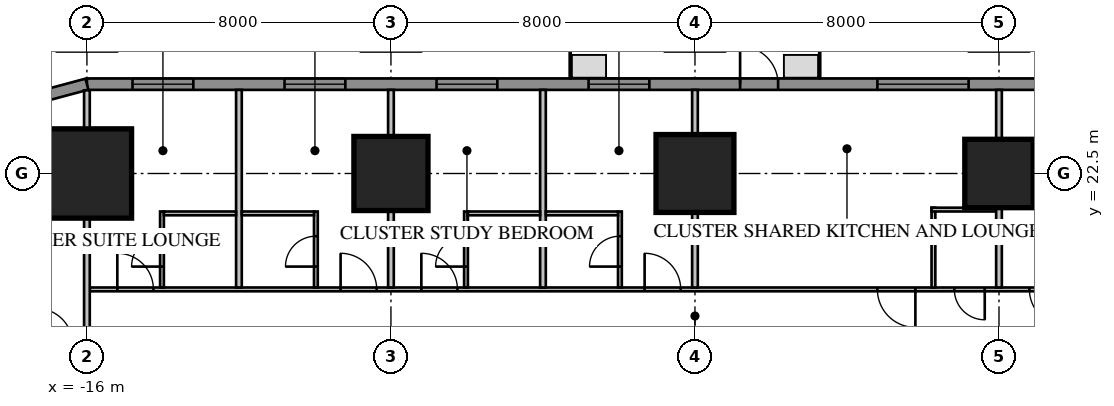
"""IFC4 building model, lengths in metres.
Left out: names, types, materials, properties, quantities, classifications, styles, units other than length and angle.
Written with IfcOpenShell. Run it as: python <this file> out.ifc"""

import sys

from ifc_helpers import new_model, si_unit, direction, frame, frame_2d, origin, origin_2d, place, context, subcontext, project, spatial, rectangle, extrude, element, fill, save


model = new_model("IFC4")
c1 = context("Model", 3, precision=1e-05, world=origin(), true_north=direction((0.0, 1.0)))
c2 = subcontext(c1, "Body", "Model", "MODEL_VIEW")
j1 = project(units=[si_unit("LENGTHUNIT", "METRE"), si_unit("PLANEANGLEUNIT", "RADIAN")], contexts=[c1])
p1 = place(None, origin())
s1 = spatial("IfcSite", under=j1, at=p1, CompositionType="ELEMENT")
p2 = place(p1, origin())
s2 = spatial("IfcBuilding", under=s1, at=p2, CompositionType="ELEMENT")
p3 = place(p2, frame((0.0, 0.0, 35.25)))
s3 = spatial("IfcBuildingStorey", under=s2, at=p3, CompositionType="ELEMENT", Elevation=35.25)
p4 = place(p3, frame((8.0, 22.5, 0.0), z_axis=(0.0, 0.0, 1.0), x_axis=(1.0, 0.0, 0.0)))
e1 = element("IfcColumn", 1, at=p4, inside=s3, PredefinedType="COLUMN", context=c2, shape_type="SweptSolid", body=[
    extrude(rectangle(XDim=1.8, YDim=1.8, at=origin_2d()), origin(), (0.0, 0.0, 1.0), 3.85),
])
p5 = place(p3, frame((0.0, 22.5, 0.0), z_axis=(0.0, 0.0, 1.0), x_axis=(1.0, 0.0, 0.0)))
e2 = element("IfcColumn", 2, at=p5, inside=s3, PredefinedType="COLUMN", context=c2, shape_type="SweptSolid", body=[
    extrude(rectangle(XDim=2.05, YDim=2.05, at=origin_2d()), origin(), (0.0, 0.0, 1.0), 3.85),
])
p6 = place(p3, frame((-8.0, 22.5, 0.0), z_axis=(0.0, 0.0, 1.0), x_axis=(1.0, 0.0, 0.0)))
e3 = element("IfcColumn", 3, at=p6, inside=s3, PredefinedType="COLUMN", context=c2, shape_type="SweptSolid", body=[
    extrude(rectangle(XDim=1.95, YDim=1.95, at=origin_2d()), origin(), (0.0, 0.0, 1.0), 3.85),
])
p7 = place(p3, frame((-16.0, 22.5, 0.0), z_axis=(0.0, 0.0, 1.0), x_axis=(1.0, 0.0, 0.0)))
e4 = element("IfcColumn", 4, at=p7, inside=s3, PredefinedType="COLUMN", context=c2, shape_type="SweptSolid", body=[
    extrude(rectangle(XDim=2.35, YDim=2.35, at=origin_2d()), origin(), (0.0, 0.0, 1.0), 3.85),
])
p8 = place(p3, frame((16.0, 24.85, 0.0), z_axis=(0.0, 0.0, 1.0), x_axis=(-1.0, 0.0, 0.0)))
e5 = element("IfcWall", 5, at=p8, inside=s3, PredefinedType="SOLIDWALL", context=c2, shape_type="SweptSolid", body=[
    extrude(rectangle(XDim=32.0, YDim=0.3, at=frame_2d((16.0, 0.0))), origin(), (0.0, 0.0, 1.0), 3.65),
])
p9 = place(p8, frame((1.2, 0.0, 0.75)))
e6 = element("IfcOpeningElement", 6, at=p9, cuts=e5, PredefinedType="OPENING", context=c2, shape_type="SweptSolid", body=[
    extrude(rectangle(XDim=1.6, YDim=1.8, at=frame_2d((0.8, 0.9))), frame((0.0, 0.17, 0.0), z_axis=(0.0, -1.0, 0.0), x_axis=(1.0, 0.0, 0.0)), (0.0, 0.0, 1.0), 0.34),
])
p10 = place(p8, frame((5.2, 0.0, 0.75)))
e7 = element("IfcOpeningElement", 7, at=p10, cuts=e5, PredefinedType="OPENING", context=c2, shape_type="SweptSolid", body=[
    extrude(rectangle(XDim=1.6, YDim=1.8, at=frame_2d((0.8, 0.9))), frame((0.0, 0.17, 0.0), z_axis=(0.0, -1.0, 0.0), x_axis=(1.0, 0.0, 0.0)), (0.0, 0.0, 1.0), 0.34),
])
p11 = place(p8, frame((17.2, 0.0, 0.75)))
e8 = element("IfcOpeningElement", 8, at=p11, cuts=e5, PredefinedType="OPENING", context=c2, shape_type="SweptSolid", body=[
    extrude(rectangle(XDim=1.6, YDim=1.8, at=frame_2d((0.8, 0.9))), frame((0.0, 0.17, 0.0), z_axis=(0.0, -1.0, 0.0), x_axis=(1.0, 0.0, 0.0)), (0.0, 0.0, 1.0), 0.34),
])
p12 = place(p8, frame((21.2, 0.0, 0.75)))
e9 = element("IfcOpeningElement", 9, at=p12, cuts=e5, PredefinedType="OPENING", context=c2, shape_type="SweptSolid", body=[
    extrude(rectangle(XDim=1.6, YDim=1.8, at=frame_2d((0.8, 0.9))), frame((0.0, 0.17, 0.0), z_axis=(0.0, -1.0, 0.0), x_axis=(1.0, 0.0, 0.0)), (0.0, 0.0, 1.0), 0.34),
])
p13 = place(p8, frame((25.2, 0.0, 0.75)))
e10 = element("IfcOpeningElement", 10, at=p13, cuts=e5, PredefinedType="OPENING", context=c2, shape_type="SweptSolid", body=[
    extrude(rectangle(XDim=1.6, YDim=1.8, at=frame_2d((0.8, 0.9))), frame((0.0, 0.17, 0.0), z_axis=(0.0, -1.0, 0.0), x_axis=(1.0, 0.0, 0.0)), (0.0, 0.0, 1.0), 0.34),
])
p14 = place(p8, frame((29.2, 0.0, 0.75)))
e11 = element("IfcOpeningElement", 11, at=p14, cuts=e5, PredefinedType="OPENING", context=c2, shape_type="SweptSolid", body=[
    extrude(rectangle(XDim=1.6, YDim=1.8, at=frame_2d((0.8, 0.9))), frame((0.0, 0.17, 0.0), z_axis=(0.0, -1.0, 0.0), x_axis=(1.0, 0.0, 0.0)), (0.0, 0.0, 1.0), 0.34),
])
p15 = place(p8, frame((8.8, 0.0, 0.75)))
e12 = element("IfcOpeningElement", 12, at=p15, cuts=e5, PredefinedType="OPENING", context=c2, shape_type="SweptSolid", body=[
    extrude(rectangle(XDim=2.4, YDim=1.8, at=frame_2d((1.2, 0.9))), frame((0.0, 0.17, 0.0), z_axis=(0.0, -1.0, 0.0), x_axis=(1.0, 0.0, 0.0)), (0.0, 0.0, 1.0), 0.34),
])
p16 = place(p8, frame((13.812, 0.0, 0.0)))
e13 = element("IfcOpeningElement", 13, at=p16, cuts=e5, PredefinedType="OPENING", context=c2, shape_type="SweptSolid", body=[
    extrude(rectangle(XDim=1.0, YDim=2.4, at=frame_2d((0.5, 1.2))), frame((0.0, 0.17, 0.0), z_axis=(0.0, -1.0, 0.0), x_axis=(1.0, 0.0, 0.0)), (0.0, 0.0, 1.0), 0.34),
])
p17 = place(p3, frame((-16.0, 24.85, 0.0), z_axis=(0.0, 0.0, 1.0), x_axis=(-0.965920218567, -0.258839972501, 0.0)))
e14 = element("IfcWall", 14, at=p17, inside=s3, PredefinedType="SOLIDWALL", context=c2, shape_type="SweptSolid", body=[
    extrude(rectangle(XDim=4.581, YDim=0.3, at=frame_2d((2.291, 0.0))), origin(), (0.0, 0.0, 1.0), 3.65),
])
p18 = place(p3, frame((15.925, 19.45, 0.0), z_axis=(0.0, 0.0, 1.0), x_axis=(-1.0, 0.0, 0.0)))
e15 = element("IfcWall", 15, at=p18, inside=s3, PredefinedType="PARTITIONING", context=c2, shape_type="SweptSolid", body=[
    extrude(rectangle(XDim=31.85, YDim=0.1, at=frame_2d((15.925, 0.0))), origin(), (0.0, 0.0, 1.0), 3.65),
])
p19 = place(p18, frame((10.125, 0.0, 0.0)))
e16 = element("IfcOpeningElement", 16, at=p19, cuts=e15, PredefinedType="OPENING", context=c2, shape_type="SweptSolid", body=[
    extrude(rectangle(XDim=1.0, YDim=2.1, at=frame_2d((0.5, 1.05))), frame((0.0, 0.07, 0.0), z_axis=(0.0, -1.0, 0.0), x_axis=(1.0, 0.0, 0.0)), (0.0, 0.0, 1.0), 0.14),
])
p20 = place(p18, frame((8.3, 0.0, 0.0)))
e17 = element("IfcOpeningElement", 17, at=p20, cuts=e15, PredefinedType="OPENING", context=c2, shape_type="SweptSolid", body=[
    extrude(rectangle(XDim=0.8, YDim=2.1, at=frame_2d((0.4, 1.05))), frame((0.0, 0.07, 0.0), z_axis=(0.0, -1.0, 0.0), x_axis=(1.0, 0.0, 0.0)), (0.0, 0.0, 1.0), 0.14),
])
p21 = place(p18, frame((0.3, 0.0, 0.0)))
e18 = element("IfcOpeningElement", 18, at=p21, cuts=e15, PredefinedType="OPENING", context=c2, shape_type="SweptSolid", body=[
    extrude(rectangle(XDim=0.95, YDim=2.1, at=frame_2d((0.475, 1.05))), frame((0.0, 0.07, 0.0), z_axis=(0.0, -1.0, 0.0), x_axis=(1.0, 0.0, 0.0)), (0.0, 0.0, 1.0), 0.14),
])
p22 = place(p18, frame((6.175, 0.0, 0.0)))
e19 = element("IfcOpeningElement", 19, at=p22, cuts=e15, PredefinedType="OPENING", context=c2, shape_type="SweptSolid", body=[
    extrude(rectangle(XDim=0.95, YDim=2.1, at=frame_2d((0.475, 1.05))), frame((0.0, 0.07, 0.0), z_axis=(0.0, -1.0, 0.0), x_axis=(1.0, 0.0, 0.0)), (0.0, 0.0, 1.0), 0.14),
])
p23 = place(p18, frame((16.3, 0.0, 0.0)))
e20 = element("IfcOpeningElement", 20, at=p23, cuts=e15, PredefinedType="OPENING", context=c2, shape_type="SweptSolid", body=[
    extrude(rectangle(XDim=0.95, YDim=2.1, at=frame_2d((0.475, 1.05))), frame((0.0, 0.07, 0.0), z_axis=(0.0, -1.0, 0.0), x_axis=(1.0, 0.0, 0.0)), (0.0, 0.0, 1.0), 0.14),
])
p24 = place(p18, frame((22.175, 0.0, 0.0)))
e21 = element("IfcOpeningElement", 21, at=p24, cuts=e15, PredefinedType="OPENING", context=c2, shape_type="SweptSolid", body=[
    extrude(rectangle(XDim=0.95, YDim=2.1, at=frame_2d((0.475, 1.05))), frame((0.0, 0.07, 0.0), z_axis=(0.0, -1.0, 0.0), x_axis=(1.0, 0.0, 0.0)), (0.0, 0.0, 1.0), 0.14),
])
p25 = place(p18, frame((24.3, 0.0, 0.0)))
e22 = element("IfcOpeningElement", 22, at=p25, cuts=e15, PredefinedType="OPENING", context=c2, shape_type="SweptSolid", body=[
    extrude(rectangle(XDim=0.95, YDim=2.1, at=frame_2d((0.475, 1.05))), frame((0.0, 0.07, 0.0), z_axis=(0.0, -1.0, 0.0), x_axis=(1.0, 0.0, 0.0)), (0.0, 0.0, 1.0), 0.14),
])
p26 = place(p18, frame((30.175, 0.0, 0.0)))
e23 = element("IfcOpeningElement", 23, at=p26, cuts=e15, PredefinedType="OPENING", context=c2, shape_type="SweptSolid", body=[
    extrude(rectangle(XDim=0.95, YDim=2.1, at=frame_2d((0.475, 1.05))), frame((0.0, 0.07, 0.0), z_axis=(0.0, -1.0, 0.0), x_axis=(1.0, 0.0, 0.0)), (0.0, 0.0, 1.0), 0.14),
])
p27 = place(p3, frame((6.275, 19.5, 0.0), z_axis=(0.0, 0.0, 1.0), x_axis=(0.0, 1.0, 0.0)))
e24 = element("IfcWall", 24, at=p27, inside=s3, PredefinedType="PARTITIONING", context=c2, shape_type="SweptSolid", body=[
    extrude(rectangle(XDim=2.1, YDim=0.1, at=frame_2d((1.05, 0.0))), origin(), (0.0, 0.0, 1.0), 3.65),
])
p28 = place(p3, frame((7.925, 21.55, 0.0), z_axis=(0.0, 0.0, 1.0), x_axis=(-1.0, 0.0, 0.0)))
e25 = element("IfcWall", 25, at=p28, inside=s3, PredefinedType="PARTITIONING", context=c2, shape_type="SweptSolid", body=[
    extrude(rectangle(XDim=1.7, YDim=0.1, at=frame_2d((0.85, 0.0))), origin(), (0.0, 0.0, 1.0), 3.65),
])
p29 = place(p3, frame((8.0, 19.5, 0.0), z_axis=(0.0, 0.0, 1.0), x_axis=(0.0, 1.0, 0.0)))
e26 = element("IfcWall", 26, at=p29, inside=s3, PredefinedType="PARTITIONING", context=c2, shape_type="SweptSolid", body=[
    extrude(rectangle(XDim=5.2, YDim=0.15, at=frame_2d((2.6, 0.0))), origin(), (0.0, 0.0, 1.0), 3.65),
])
p30 = place(p3, frame((0.0, 19.5, 0.0), z_axis=(0.0, 0.0, 1.0), x_axis=(0.0, 1.0, 0.0)))
e27 = element("IfcWall", 27, at=p30, inside=s3, PredefinedType="PARTITIONING", context=c2, shape_type="SweptSolid", body=[
    extrude(rectangle(XDim=5.2, YDim=0.15, at=frame_2d((2.6, 0.0))), origin(), (0.0, 0.0, 1.0), 2.809),
])
for number, where, z_axis, x_axis in (
    (28, (-4.0, 19.5, 0.0), (0.0, 0.0, 1.0), (0.0, 1.0, 0.0)),
    (29, (-8.0, 19.5, 0.0), (0.0, 0.0, 1.0), (0.0, 1.0, 0.0)),
    (30, (-12.0, 19.5, 0.0), (0.0, 0.0, 1.0), (0.0, 1.0, 0.0)),
):
    element("IfcWall", number, at=place(p3, frame(where, z_axis=z_axis, x_axis=x_axis)), inside=s3, PredefinedType="PARTITIONING", context=c2, shape_type="SweptSolid", body=[
        extrude(rectangle(XDim=5.2, YDim=0.15, at=frame_2d((2.6, 0.0))), origin(), (0.0, 0.0, 1.0), 3.65),
    ])
p31 = place(p3, frame((-16.0, 18.1, 0.0), z_axis=(0.0, 0.0, 1.0), x_axis=(0.0, 1.0, 0.0)))
e31 = element("IfcWall", 31, at=p31, inside=s3, PredefinedType="PARTITIONING", context=c2, shape_type="SweptSolid", body=[
    extrude(rectangle(XDim=6.589, YDim=0.15, at=frame_2d((3.295, 0.0))), origin(), (0.0, 0.0, 1.0), 3.65),
])
p32 = place(p3, frame((-1.975, 19.5, 0.0), z_axis=(0.0, 0.0, 1.0), x_axis=(0.0, 1.0, 0.0)))
e32 = element("IfcWall", 32, at=p32, inside=s3, PredefinedType="PARTITIONING", context=c2, shape_type="SweptSolid", body=[
    extrude(rectangle(XDim=2.0, YDim=0.1, at=frame_2d((1.0, 0.0))), origin(), (0.0, 0.0, 1.0), 3.65),
])
p33 = place(p32, frame((0.55, 0.0, 0.0)))
e33 = element("IfcOpeningElement", 33, at=p33, cuts=e32, PredefinedType="OPENING", context=c2, shape_type="SweptSolid", body=[
    extrude(rectangle(XDim=0.8, YDim=2.1, at=frame_2d((0.4, 1.05))), frame((0.0, 0.07, 0.0), z_axis=(0.0, -1.0, 0.0), x_axis=(1.0, 0.0, 0.0)), (0.0, 0.0, 1.0), 0.14),
])
p34 = place(p3, frame((-2.025, 21.45, 0.0), z_axis=(0.0, 0.0, 1.0), x_axis=(-1.0, 0.0, 0.0)))
e34 = element("IfcWall", 34, at=p34, inside=s3, PredefinedType="PARTITIONING", context=c2, shape_type="SweptSolid", body=[
    extrude(rectangle(XDim=1.9, YDim=0.1, at=frame_2d((0.95, 0.0))), origin(), (0.0, 0.0, 1.0), 3.65),
])
p35 = place(p3, frame((-6.025, 19.5, 0.0), z_axis=(0.0, 0.0, 1.0), x_axis=(0.0, 1.0, 0.0)))
e35 = element("IfcWall", 35, at=p35, inside=s3, PredefinedType="PARTITIONING", context=c2, shape_type="SweptSolid", body=[
    extrude(rectangle(XDim=2.0, YDim=0.1, at=frame_2d((1.0, 0.0))), origin(), (0.0, 0.0, 1.0), 3.65),
])
p36 = place(p35, frame((0.55, 0.0, 0.0)))
e36 = element("IfcOpeningElement", 36, at=p36, cuts=e35, PredefinedType="OPENING", context=c2, shape_type="SweptSolid", body=[
    extrude(rectangle(XDim=0.8, YDim=2.1, at=frame_2d((0.4, 1.05))), frame((0.0, 0.07, 0.0), z_axis=(0.0, -1.0, 0.0), x_axis=(1.0, 0.0, 0.0)), (0.0, 0.0, 1.0), 0.14),
])
p37 = place(p3, frame((-4.075, 21.45, 0.0), z_axis=(0.0, 0.0, 1.0), x_axis=(-1.0, 0.0, 0.0)))
e37 = element("IfcWall", 37, at=p37, inside=s3, PredefinedType="PARTITIONING", context=c2, shape_type="SweptSolid", body=[
    extrude(rectangle(XDim=1.9, YDim=0.1, at=frame_2d((0.95, 0.0))), origin(), (0.0, 0.0, 1.0), 3.65),
])
p38 = place(p3, frame((-9.975, 19.5, 0.0), z_axis=(0.0, 0.0, 1.0), x_axis=(0.0, 1.0, 0.0)))
e38 = element("IfcWall", 38, at=p38, inside=s3, PredefinedType="PARTITIONING", context=c2, shape_type="SweptSolid", body=[
    extrude(rectangle(XDim=2.0, YDim=0.1, at=frame_2d((1.0, 0.0))), origin(), (0.0, 0.0, 1.0), 3.65),
])
p39 = place(p38, frame((0.55, 0.0, 0.0)))
e39 = element("IfcOpeningElement", 39, at=p39, cuts=e38, PredefinedType="OPENING", context=c2, shape_type="SweptSolid", body=[
    extrude(rectangle(XDim=0.8, YDim=2.1, at=frame_2d((0.4, 1.05))), frame((0.0, 0.07, 0.0), z_axis=(0.0, -1.0, 0.0), x_axis=(1.0, 0.0, 0.0)), (0.0, 0.0, 1.0), 0.14),
])
p40 = place(p3, frame((-10.025, 21.45, 0.0), z_axis=(0.0, 0.0, 1.0), x_axis=(-1.0, 0.0, 0.0)))
e40 = element("IfcWall", 40, at=p40, inside=s3, PredefinedType="PARTITIONING", context=c2, shape_type="SweptSolid", body=[
    extrude(rectangle(XDim=1.9, YDim=0.1, at=frame_2d((0.95, 0.0))), origin(), (0.0, 0.0, 1.0), 3.65),
])
p41 = place(p3, frame((-14.025, 19.5, 0.0), z_axis=(0.0, 0.0, 1.0), x_axis=(0.0, 1.0, 0.0)))
e41 = element("IfcWall", 41, at=p41, inside=s3, PredefinedType="PARTITIONING", context=c2, shape_type="SweptSolid", body=[
    extrude(rectangle(XDim=2.0, YDim=0.1, at=frame_2d((1.0, 0.0))), origin(), (0.0, 0.0, 1.0), 3.65),
])
p42 = place(p41, frame((0.55, 0.0, 0.0)))
e42 = element("IfcOpeningElement", 42, at=p42, cuts=e41, PredefinedType="OPENING", context=c2, shape_type="SweptSolid", body=[
    extrude(rectangle(XDim=0.8, YDim=2.1, at=frame_2d((0.4, 1.05))), frame((0.0, 0.07, 0.0), z_axis=(0.0, -1.0, 0.0), x_axis=(1.0, 0.0, 0.0)), (0.0, 0.0, 1.0), 0.14),
])
p43 = place(p3, frame((-12.075, 21.45, 0.0), z_axis=(0.0, 0.0, 1.0), x_axis=(-1.0, 0.0, 0.0)))
e43 = element("IfcWall", 43, at=p43, inside=s3, PredefinedType="PARTITIONING", context=c2, shape_type="SweptSolid", body=[
    extrude(rectangle(XDim=1.9, YDim=0.1, at=frame_2d((0.95, 0.0))), origin(), (0.0, 0.0, 1.0), 3.65),
])
p44 = place(p11, origin())
e44 = element("IfcWindow", 44, at=p44, inside=s3, PartitioningType="SINGLE_PANEL", PredefinedType="WINDOW", context=c2, shape_type="SweptSolid", body=[
    extrude(rectangle(XDim=1.6, YDim=1.8, at=frame_2d((0.8, 0.9))), frame((0.0, 0.03, 0.0), z_axis=(0.0, -1.0, 0.0), x_axis=(1.0, 0.0, 0.0)), (0.0, 0.0, 1.0), 0.06),
])
fill(e8, e44)
p45 = place(p12, origin())
e45 = element("IfcWindow", 45, at=p45, inside=s3, PartitioningType="SINGLE_PANEL", PredefinedType="WINDOW", context=c2, shape_type="SweptSolid", body=[
    extrude(rectangle(XDim=1.6, YDim=1.8, at=frame_2d((0.8, 0.9))), frame((0.0, 0.03, 0.0), z_axis=(0.0, -1.0, 0.0), x_axis=(1.0, 0.0, 0.0)), (0.0, 0.0, 1.0), 0.06),
])
fill(e9, e45)
p46 = place(p13, origin())
e46 = element("IfcWindow", 46, at=p46, inside=s3, PartitioningType="SINGLE_PANEL", PredefinedType="WINDOW", context=c2, shape_type="SweptSolid", body=[
    extrude(rectangle(XDim=1.6, YDim=1.8, at=frame_2d((0.8, 0.9))), frame((0.0, 0.03, 0.0), z_axis=(0.0, -1.0, 0.0), x_axis=(1.0, 0.0, 0.0)), (0.0, 0.0, 1.0), 0.06),
])
fill(e10, e46)
p47 = place(p14, origin())
e47 = element("IfcWindow", 47, at=p47, inside=s3, PartitioningType="SINGLE_PANEL", PredefinedType="WINDOW", context=c2, shape_type="SweptSolid", body=[
    extrude(rectangle(XDim=1.6, YDim=1.8, at=frame_2d((0.8, 0.9))), frame((0.0, 0.03, 0.0), z_axis=(0.0, -1.0, 0.0), x_axis=(1.0, 0.0, 0.0)), (0.0, 0.0, 1.0), 0.06),
])
fill(e11, e47)
p48 = place(p15, origin())
e48 = element("IfcWindow", 48, at=p48, inside=s3, PartitioningType="SINGLE_PANEL", PredefinedType="WINDOW", context=c2, shape_type="SweptSolid", body=[
    extrude(rectangle(XDim=2.4, YDim=1.8, at=frame_2d((1.2, 0.9))), frame((0.0, 0.03, 0.0), z_axis=(0.0, -1.0, 0.0), x_axis=(1.0, 0.0, 0.0)), (0.0, 0.0, 1.0), 0.06),
])
fill(e12, e48)
p49 = place(p16, origin())
e49 = element("IfcDoor", 49, at=p49, inside=s3, OperationType="SINGLE_SWING_RIGHT", PredefinedType="DOOR", context=c2, shape_type="SweptSolid", body=[
    extrude(rectangle(XDim=1.0, YDim=2.4, at=frame_2d((0.5, 1.2))), frame((0.0, 0.025, 0.0), z_axis=(0.0, -1.0, 0.0), x_axis=(1.0, 0.0, 0.0)), (0.0, 0.0, 1.0), 0.05),
])
fill(e13, e49)
p50 = place(p19, origin())
e50 = element("IfcDoor", 50, at=p50, inside=s3, OperationType="SINGLE_SWING_LEFT", PredefinedType="DOOR", context=c2, shape_type="SweptSolid", body=[
    extrude(rectangle(XDim=1.0, YDim=2.1, at=frame_2d((0.5, 1.05))), frame((0.0, 0.025, 0.0), z_axis=(0.0, -1.0, 0.0), x_axis=(1.0, 0.0, 0.0)), (0.0, 0.0, 1.0), 0.05),
])
fill(e16, e50)
p51 = place(p20, origin())
e51 = element("IfcDoor", 51, at=p51, inside=s3, OperationType="SINGLE_SWING_LEFT", PredefinedType="DOOR", context=c2, shape_type="SweptSolid", body=[
    extrude(rectangle(XDim=0.8, YDim=2.1, at=frame_2d((0.4, 1.05))), frame((0.0, 0.025, 0.0), z_axis=(0.0, -1.0, 0.0), x_axis=(1.0, 0.0, 0.0)), (0.0, 0.0, 1.0), 0.05),
])
fill(e17, e51)
p52 = place(p22, origin())
e52 = element("IfcDoor", 52, at=p52, inside=s3, OperationType="SINGLE_SWING_LEFT", PredefinedType="DOOR", context=c2, shape_type="SweptSolid", body=[
    extrude(rectangle(XDim=0.95, YDim=2.1, at=frame_2d((0.475, 1.05))), frame((0.0, 0.025, 0.0), z_axis=(0.0, -1.0, 0.0), x_axis=(1.0, 0.0, 0.0)), (0.0, 0.0, 1.0), 0.05),
])
fill(e19, e52)
p53 = place(p23, origin())
e53 = element("IfcDoor", 53, at=p53, inside=s3, OperationType="SINGLE_SWING_RIGHT", PredefinedType="DOOR", context=c2, shape_type="SweptSolid", body=[
    extrude(rectangle(XDim=0.95, YDim=2.1, at=frame_2d((0.475, 1.05))), frame((0.0, 0.025, 0.0), z_axis=(0.0, -1.0, 0.0), x_axis=(1.0, 0.0, 0.0)), (0.0, 0.0, 1.0), 0.05),
])
fill(e20, e53)
p54 = place(p33, origin())
e54 = element("IfcDoor", 54, at=p54, inside=s3, OperationType="SINGLE_SWING_LEFT", PredefinedType="DOOR", context=c2, shape_type="SweptSolid", body=[
    extrude(rectangle(XDim=0.8, YDim=2.1, at=frame_2d((0.4, 1.05))), frame((0.0, 0.025, 0.0), z_axis=(0.0, -1.0, 0.0), x_axis=(1.0, 0.0, 0.0)), (0.0, 0.0, 1.0), 0.05),
])
fill(e33, e54)
p55 = place(p24, origin())
e55 = element("IfcDoor", 55, at=p55, inside=s3, OperationType="SINGLE_SWING_RIGHT", PredefinedType="DOOR", context=c2, shape_type="SweptSolid", body=[
    extrude(rectangle(XDim=0.95, YDim=2.1, at=frame_2d((0.475, 1.05))), frame((0.0, 0.025, 0.0), z_axis=(0.0, -1.0, 0.0), x_axis=(1.0, 0.0, 0.0)), (0.0, 0.0, 1.0), 0.05),
])
fill(e21, e55)
p56 = place(p36, origin())
e56 = element("IfcDoor", 56, at=p56, inside=s3, OperationType="SINGLE_SWING_LEFT", PredefinedType="DOOR", context=c2, shape_type="SweptSolid", body=[
    extrude(rectangle(XDim=0.8, YDim=2.1, at=frame_2d((0.4, 1.05))), frame((0.0, 0.025, 0.0), z_axis=(0.0, -1.0, 0.0), x_axis=(1.0, 0.0, 0.0)), (0.0, 0.0, 1.0), 0.05),
])
fill(e36, e56)
p57 = place(p25, origin())
e57 = element("IfcDoor", 57, at=p57, inside=s3, OperationType="SINGLE_SWING_RIGHT", PredefinedType="DOOR", context=c2, shape_type="SweptSolid", body=[
    extrude(rectangle(XDim=0.95, YDim=2.1, at=frame_2d((0.475, 1.05))), frame((0.0, 0.025, 0.0), z_axis=(0.0, -1.0, 0.0), x_axis=(1.0, 0.0, 0.0)), (0.0, 0.0, 1.0), 0.05),
])
fill(e22, e57)
p58 = place(p39, origin())
e58 = element("IfcDoor", 58, at=p58, inside=s3, OperationType="SINGLE_SWING_LEFT", PredefinedType="DOOR", context=c2, shape_type="SweptSolid", body=[
    extrude(rectangle(XDim=0.8, YDim=2.1, at=frame_2d((0.4, 1.05))), frame((0.0, 0.025, 0.0), z_axis=(0.0, -1.0, 0.0), x_axis=(1.0, 0.0, 0.0)), (0.0, 0.0, 1.0), 0.05),
])
fill(e39, e58)
p59 = place(p26, origin())
e59 = element("IfcDoor", 59, at=p59, inside=s3, OperationType="SINGLE_SWING_RIGHT", PredefinedType="DOOR", context=c2, shape_type="SweptSolid", body=[
    extrude(rectangle(XDim=0.95, YDim=2.1, at=frame_2d((0.475, 1.05))), frame((0.0, 0.025, 0.0), z_axis=(0.0, -1.0, 0.0), x_axis=(1.0, 0.0, 0.0)), (0.0, 0.0, 1.0), 0.05),
])
fill(e23, e59)
p60 = place(p42, origin())
e60 = element("IfcDoor", 60, at=p60, inside=s3, OperationType="SINGLE_SWING_LEFT", PredefinedType="DOOR", context=c2, shape_type="SweptSolid", body=[
    extrude(rectangle(XDim=0.8, YDim=2.1, at=frame_2d((0.4, 1.05))), frame((0.0, 0.025, 0.0), z_axis=(0.0, -1.0, 0.0), x_axis=(1.0, 0.0, 0.0)), (0.0, 0.0, 1.0), 0.05),
])
fill(e42, e60)
save(model, sys.argv[1])
